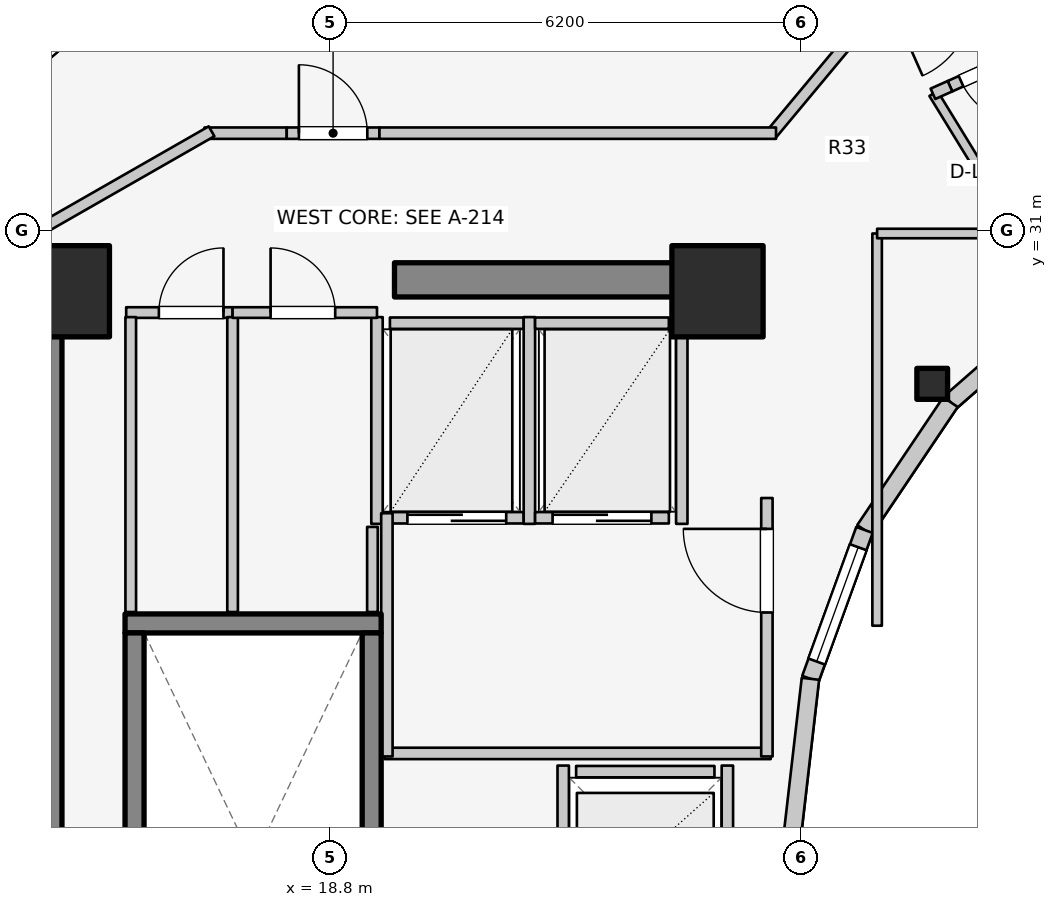
"""IFC4 building model, lengths in metres.
Left out: names, types, materials, properties, quantities, classifications, styles, units other than length and angle.
Written with IfcOpenShell. Run it as: python <this file> out.ifc"""

import sys

from ifc_helpers import new_model, si_unit, direction, frame, frame_2d, origin, origin_2d, place, context, subcontext, project, spatial, rectangle, i_section, extrude, element, fill, save


model = new_model("IFC4")
c1 = context("Model", 3, precision=1e-05, world=origin(), true_north=direction((0.0, 1.0)))
c2 = subcontext(c1, "Body", "Model", "MODEL_VIEW")
j1 = project(units=[si_unit("LENGTHUNIT", "METRE"), si_unit("PLANEANGLEUNIT", "RADIAN")], contexts=[c1])
p1 = place(None, origin())
s1 = spatial("IfcSite", under=j1, at=p1, CompositionType="ELEMENT")
p2 = place(p1, origin())
s2 = spatial("IfcBuilding", under=s1, at=p2, CompositionType="ELEMENT")
p3 = place(p2, frame((0.0, 0.0, 256.8)))
s3 = spatial("IfcBuildingStorey", under=s2, at=p3, CompositionType="ELEMENT", Elevation=256.8)
p4 = place(p3, frame((15.05, 17.05, 0.0), z_axis=(0.0, 0.0, 1.0), x_axis=(0.0, 1.0, 0.0)))
e1 = element("IfcWall", 1, at=p4, inside=s3, PredefinedType="SHEAR", context=c2, shape_type="SweptSolid", body=[
    extrude(rectangle(XDim=12.8, YDim=0.45, at=frame_2d((6.4, 0.0))), origin(), (0.0, 0.0, 1.0), 3.6),
])
p5 = place(p3, frame((19.65, 30.35, 0.0), z_axis=(0.0, 0.0, 1.0), x_axis=(1.0, 0.0, 0.0)))
e2 = element("IfcWall", 2, at=p5, inside=s3, PredefinedType="SHEAR", context=c2, shape_type="SweptSolid", body=[
    extrude(rectangle(XDim=4.5, YDim=0.45, at=frame_2d((2.25, 0.0))), origin(), (0.0, 0.0, 1.0), 3.6),
])
p6 = place(p3, frame((16.105, 25.83, 0.0), z_axis=(0.0, 0.0, 1.0), x_axis=(1.0, 0.0, 0.0)))
e3 = element("IfcWall", 3, at=p6, inside=s3, PredefinedType="SOLIDWALL", context=c2, shape_type="SweptSolid", body=[
    extrude(rectangle(XDim=3.37, YDim=0.25, at=frame_2d((1.685, 0.0))), origin(), (0.0, 0.0, 1.0), 3.6),
])
for number, where, z_axis, x_axis in (
    (4, (16.23, 17.895, 0.0), (0.0, 0.0, 1.0), (0.0, 1.0, 0.0)),
    (5, (19.35, 17.895, 0.0), (0.0, 0.0, 1.0), (0.0, 1.0, 0.0)),
):
    element("IfcWall", number, at=place(p3, frame(where, z_axis=z_axis, x_axis=x_axis)), inside=s3, PredefinedType="SOLIDWALL", context=c2, shape_type="SweptSolid", body=[
        extrude(rectangle(XDim=7.81, YDim=0.25, at=frame_2d((3.905, 0.0))), origin(), (0.0, 0.0, 1.0), 3.6),
    ])
for number, where, z_axis, x_axis in (
    (6, (23.9, 30.2, 0.0), (0.0, 0.0, 1.0), (1.0, 0.0, 0.0)),
    (7, (15.3, 30.2, 0.0), (0.0, 0.0, 1.0), (1.0, 0.0, 0.0)),
):
    element("IfcColumn", number, at=place(p3, frame(where, z_axis=z_axis, x_axis=x_axis)), inside=s3, PredefinedType="COLUMN", context=c2, shape_type="SweptSolid", body=[
        extrude(rectangle(XDim=1.2, YDim=1.2, at=origin_2d()), origin(), (0.0, 0.0, 1.0), 3.6),
    ])
p7 = place(p3, frame((26.725, 28.982, 0.0), z_axis=(0.0, 0.0, 1.0), x_axis=(1.0, 0.0, 0.0)))
e8 = element("IfcColumn", 8, at=p7, inside=s3, PredefinedType="COLUMN", context=c2, shape_type="SweptSolid", body=[
    extrude(i_section(OverallWidth=0.404, OverallDepth=0.407, WebThickness=0.027, FlangeThickness=0.044, FilletRadius=0.025, at=origin_2d()), origin(), (0.0, 0.0, 1.0), 3.6),
])
p8 = place(p3, frame((28.44, 30.032, 0.0), z_axis=(0.0, 0.0, 1.0), x_axis=(-0.752576694707, -0.658504607869, 0.0)))
e9 = element("IfcWall", 9, at=p8, inside=s3, PredefinedType="STANDARD", context=c2, shape_type="SweptSolid", body=[
    extrude(rectangle(XDim=1.959, YDim=0.23, at=frame_2d((0.98, 0.0))), origin(), (0.0, 0.0, 1.0), 1.72),
])
p9 = place(p3, frame((26.965, 28.742, 0.0), z_axis=(0.0, 0.0, 1.0), x_axis=(-0.558197800898, -0.829707909492, 0.0)))
e10 = element("IfcWall", 10, at=p9, inside=s3, PredefinedType="STANDARD", context=c2, shape_type="SweptSolid", body=[
    extrude(rectangle(XDim=2.027, YDim=0.23, at=frame_2d((1.013, 0.0))), origin(), (0.0, 0.0, 1.0), 1.72),
])
p10 = place(p3, frame((25.834, 27.06, 0.0), z_axis=(0.0, 0.0, 1.0), x_axis=(-0.341423187295, -0.93990968033, 0.0)))
e11 = element("IfcWall", 11, at=p10, inside=s3, PredefinedType="STANDARD", context=c2, shape_type="SweptSolid", body=[
    extrude(rectangle(XDim=2.084, YDim=0.23, at=frame_2d((1.042, 0.0))), origin(), (0.0, 0.0, 1.0), 3.06),
])
p11 = place(p10, frame((0.242, 0.0, 0.85)))
e12 = element("IfcOpeningElement", 12, at=p11, cuts=e11, PredefinedType="OPENING", context=c2, shape_type="SweptSolid", body=[
    extrude(rectangle(XDim=1.6, YDim=1.65, at=frame_2d((0.8, 0.825))), frame((0.0, 0.125, 0.0), z_axis=(0.0, -1.0, 0.0), x_axis=(1.0, 0.0, 0.0)), (0.0, 0.0, 1.0), 0.25),
])
p12 = place(p3, frame((25.123, 25.102, 0.0), z_axis=(0.0, 0.0, 1.0), x_axis=(-0.114711713601, -0.993398823617, 0.0)))
e13 = element("IfcWall", 13, at=p12, inside=s3, PredefinedType="STANDARD", context=c2, shape_type="SweptSolid", body=[
    extrude(rectangle(XDim=2.115, YDim=0.23, at=frame_2d((1.058, 0.0))), origin(), (0.0, 0.0, 1.0), 3.06),
])
p13 = place(p3, frame((16.442, 34.572, 0.0), z_axis=(0.0, 0.0, 1.0), x_axis=(-0.759587504333, -0.650405122413, 0.0)))
e14 = element("IfcWall", 14, at=p13, inside=s3, PredefinedType="STANDARD", context=c2, shape_type="SweptSolid", body=[
    extrude(rectangle(XDim=4.217, YDim=0.26, at=frame_2d((2.109, 0.0))), origin(), (0.0, 0.0, 1.0), 1.72),
])
p14 = place(p13, frame((1.509, 0.0, 0.15)))
e15 = element("IfcOpeningElement", 15, at=p14, cuts=e14, PredefinedType="OPENING", context=c2, shape_type="SweptSolid", body=[
    extrude(rectangle(XDim=1.2, YDim=0.9, at=frame_2d((0.6, 0.45))), frame((0.0, 0.14, 0.0), z_axis=(0.0, -1.0, 0.0), x_axis=(1.0, 0.0, 0.0)), (0.0, 0.0, 1.0), 0.28),
])
p15 = place(p3, frame((22.04, 23.88, 0.0), z_axis=(0.0, 0.0, 1.0), x_axis=(1.0, 0.0, 0.0)))
e16 = element("IfcWall", 16, at=p15, inside=s3, PredefinedType="SOLIDWALL", context=c2, shape_type="SweptSolid", body=[
    extrude(rectangle(XDim=1.82, YDim=0.15, at=frame_2d((0.91, 0.0))), origin(), (0.0, 0.0, 1.0), 2.62),
])
p16 = place(p3, frame((21.87, 21.64, 0.0), z_axis=(0.0, 0.0, 1.0), x_axis=(0.0, 1.0, 0.0)))
e17 = element("IfcWall", 17, at=p16, inside=s3, PredefinedType="SOLIDWALL", context=c2, shape_type="SweptSolid", body=[
    extrude(rectangle(XDim=2.32, YDim=0.15, at=frame_2d((1.16, 0.0))), origin(), (0.0, 0.0, 1.0), 3.075),
])
p17 = place(p3, frame((24.03, 21.64, 0.0), z_axis=(0.0, 0.0, 1.0), x_axis=(0.0, 1.0, 0.0)))
e18 = element("IfcWall", 18, at=p17, inside=s3, PredefinedType="SOLIDWALL", context=c2, shape_type="SweptSolid", body=[
    extrude(rectangle(XDim=2.32, YDim=0.15, at=frame_2d((1.16, 0.0))), origin(), (0.0, 0.0, 1.0), 2.62),
])
p18 = place(p3, frame((19.59, 27.22, 0.0), z_axis=(0.0, 0.0, 1.0), x_axis=(1.0, 0.0, 0.0)))
e19 = element("IfcWall", 19, at=p18, inside=s3, PredefinedType="SOLIDWALL", context=c2, shape_type="SweptSolid", body=[
    extrude(rectangle(XDim=1.76, YDim=0.15, at=frame_2d((0.88, 0.0))), origin(), (0.0, 0.0, 1.0), 3.075),
])
p19 = place(p18, frame((0.23, 0.0, 0.0)))
e20 = element("IfcOpeningElement", 20, at=p19, cuts=e19, PredefinedType="OPENING", context=c2, shape_type="SweptSolid", body=[
    extrude(rectangle(XDim=1.3, YDim=2.1, at=frame_2d((0.65, 1.05))), frame((0.0, 0.085, 0.0), z_axis=(0.0, -1.0, 0.0), x_axis=(1.0, 0.0, 0.0)), (0.0, 0.0, 1.0), 0.17),
])
p20 = place(p3, frame((19.59, 29.78, 0.0), z_axis=(0.0, 0.0, 1.0), x_axis=(1.0, 0.0, 0.0)))
e21 = element("IfcWall", 21, at=p20, inside=s3, PredefinedType="SOLIDWALL", context=c2, shape_type="SweptSolid", body=[
    extrude(rectangle(XDim=1.76, YDim=0.15, at=frame_2d((0.88, 0.0))), origin(), (0.0, 0.0, 1.0), 3.075),
])
for number, where, z_axis, x_axis in (
    (22, (19.42, 27.14, 0.0), (0.0, 0.0, 1.0), (0.0, 1.0, 0.0)),
    (23, (21.425, 27.14, 0.0), (0.0, 0.0, 1.0), (0.0, 1.0, 0.0)),
):
    element("IfcWall", number, at=place(p3, frame(where, z_axis=z_axis, x_axis=x_axis)), inside=s3, PredefinedType="SOLIDWALL", context=c2, shape_type="SweptSolid", body=[
        extrude(rectangle(XDim=2.72, YDim=0.15, at=frame_2d((1.36, 0.0))), origin(), (0.0, 0.0, 1.0), 3.075),
    ])
p21 = place(p3, frame((21.5, 27.22, 0.0), z_axis=(0.0, 0.0, 1.0), x_axis=(1.0, 0.0, 0.0)))
e24 = element("IfcWall", 24, at=p21, inside=s3, PredefinedType="SOLIDWALL", context=c2, shape_type="SweptSolid", body=[
    extrude(rectangle(XDim=1.76, YDim=0.15, at=frame_2d((0.88, 0.0))), origin(), (0.0, 0.0, 1.0), 3.075),
])
p22 = place(p21, frame((0.23, 0.0, 0.0)))
e25 = element("IfcOpeningElement", 25, at=p22, cuts=e24, PredefinedType="OPENING", context=c2, shape_type="SweptSolid", body=[
    extrude(rectangle(XDim=1.3, YDim=2.1, at=frame_2d((0.65, 1.05))), frame((0.0, 0.085, 0.0), z_axis=(0.0, -1.0, 0.0), x_axis=(1.0, 0.0, 0.0)), (0.0, 0.0, 1.0), 0.17),
])
p23 = place(p3, frame((21.5, 29.78, 0.0), z_axis=(0.0, 0.0, 1.0), x_axis=(1.0, 0.0, 0.0)))
e26 = element("IfcWall", 26, at=p23, inside=s3, PredefinedType="SOLIDWALL", context=c2, shape_type="SweptSolid", body=[
    extrude(rectangle(XDim=1.76, YDim=0.15, at=frame_2d((0.88, 0.0))), origin(), (0.0, 0.0, 1.0), 3.075),
])
p24 = place(p3, frame((23.43, 27.14, 0.0), z_axis=(0.0, 0.0, 1.0), x_axis=(0.0, 1.0, 0.0)))
e27 = element("IfcWall", 27, at=p24, inside=s3, PredefinedType="SOLIDWALL", context=c2, shape_type="SweptSolid", body=[
    extrude(rectangle(XDim=2.72, YDim=0.15, at=frame_2d((1.36, 0.0))), origin(), (0.0, 0.0, 1.0), 3.075),
])
p25 = place(p3, frame((19.52, 24.12, 0.0), z_axis=(0.0, 0.0, 1.0), x_axis=(1.0, 0.0, 0.0)))
e28 = element("IfcWall", 28, at=p25, inside=s3, PredefinedType="PARTITIONING", context=c2, shape_type="SweptSolid", body=[
    extrude(rectangle(XDim=5.08, YDim=0.15, at=frame_2d((2.54, 0.0))), origin(), (0.0, 0.0, 1.0), 2.62),
])
p26 = place(p3, frame((19.55, 24.08, 0.0), z_axis=(0.0, 0.0, 1.0), x_axis=(0.0, 1.0, 0.0)))
e29 = element("IfcWall", 29, at=p26, inside=s3, PredefinedType="PARTITIONING", context=c2, shape_type="SweptSolid", body=[
    extrude(rectangle(XDim=3.2, YDim=0.15, at=frame_2d((1.6, 0.0))), origin(), (0.0, 0.0, 1.0), 3.075),
])
p27 = place(p3, frame((24.55, 24.08, 0.0), z_axis=(0.0, 0.0, 1.0), x_axis=(0.0, 1.0, 0.0)))
e30 = element("IfcWall", 30, at=p27, inside=s3, PredefinedType="PARTITIONING", context=c2, shape_type="SweptSolid", body=[
    extrude(rectangle(XDim=3.4, YDim=0.15, at=frame_2d((1.7, 0.0))), origin(), (0.0, 0.0, 1.0), 3.075),
])
p28 = place(p27, frame((1.894, 0.0, 0.0)))
e31 = element("IfcOpeningElement", 31, at=p28, cuts=e30, PredefinedType="OPENING", context=c2, shape_type="SweptSolid", body=[
    extrude(rectangle(XDim=1.1, YDim=2.1, at=frame_2d((0.55, 1.05))), frame((0.0, 0.085, 0.0), z_axis=(0.0, -1.0, 0.0), x_axis=(1.0, 0.0, 0.0)), (0.0, 0.0, 1.0), 0.17),
])
p29 = place(p3, frame((16.12, 29.92, 0.0), z_axis=(0.0, 0.0, 1.0), x_axis=(1.0, 0.0, 0.0)))
e32 = element("IfcWall", 32, at=p29, inside=s3, PredefinedType="PLUMBINGWALL", context=c2, shape_type="SweptSolid", body=[
    extrude(rectangle(XDim=1.4, YDim=0.14, at=frame_2d((0.7, 0.0))), origin(), (0.0, 0.0, 1.0), 3.075),
])
p30 = place(p29, frame((0.43, 0.0, 0.0)))
e33 = element("IfcOpeningElement", 33, at=p30, cuts=e32, PredefinedType="OPENING", context=c2, shape_type="SweptSolid", body=[
    extrude(rectangle(XDim=0.85, YDim=2.05, at=frame_2d((0.425, 1.025))), frame((0.0, 0.08, 0.0), z_axis=(0.0, -1.0, 0.0), x_axis=(1.0, 0.0, 0.0)), (0.0, 0.0, 1.0), 0.16),
])
for number, where, z_axis, x_axis in (
    (34, (16.18, 25.98, 0.0), (0.0, 0.0, 1.0), (0.0, 1.0, 0.0)),
    (35, (17.52, 25.98, 0.0), (0.0, 0.0, 1.0), (0.0, 1.0, 0.0)),
):
    element("IfcWall", number, at=place(p3, frame(where, z_axis=z_axis, x_axis=x_axis)), inside=s3, PredefinedType="PLUMBINGWALL", context=c2, shape_type="SweptSolid", body=[
        extrude(rectangle(XDim=3.88, YDim=0.14, at=frame_2d((1.94, 0.0))), origin(), (0.0, 0.0, 1.0), 3.075),
    ])
p31 = place(p3, frame((17.52, 29.92, 0.0), z_axis=(0.0, 0.0, 1.0), x_axis=(1.0, 0.0, 0.0)))
e36 = element("IfcWall", 36, at=p31, inside=s3, PredefinedType="PLUMBINGWALL", context=c2, shape_type="SweptSolid", body=[
    extrude(rectangle(XDim=1.9, YDim=0.14, at=frame_2d((0.95, 0.0))), origin(), (0.0, 0.0, 1.0), 3.075),
])
p32 = place(p31, frame((0.5, 0.0, 0.0)))
e37 = element("IfcOpeningElement", 37, at=p32, cuts=e36, PredefinedType="OPENING", context=c2, shape_type="SweptSolid", body=[
    extrude(rectangle(XDim=0.85, YDim=2.05, at=frame_2d((0.425, 1.025))), frame((0.0, 0.08, 0.0), z_axis=(0.0, -1.0, 0.0), x_axis=(1.0, 0.0, 0.0)), (0.0, 0.0, 1.0), 0.16),
])
p33 = place(p3, frame((19.36, 25.98, 0.0), z_axis=(0.0, 0.0, 1.0), x_axis=(0.0, 1.0, 0.0)))
e38 = element("IfcWall", 38, at=p33, inside=s3, PredefinedType="PLUMBINGWALL", context=c2, shape_type="SweptSolid", body=[
    extrude(rectangle(XDim=1.12, YDim=0.14, at=frame_2d((0.56, 0.0))), origin(), (0.0, 0.0, 1.0), 3.075),
])
p34 = place(p3, frame((28.45, 30.015, 0.0), z_axis=(0.0, 0.0, 1.0), x_axis=(-0.522763432117, 0.852477796802, 0.0)))
e39 = element("IfcWall", 39, at=p34, inside=s3, PredefinedType="PARTITIONING", context=c2, shape_type="SweptSolid", body=[
    extrude(rectangle(XDim=3.269, YDim=0.125, at=frame_2d((1.635, 0.0))), origin(), (0.0, 0.0, 1.0), 1.72),
])
p35 = place(p3, frame((28.118, 33.415, 0.0), z_axis=(0.0, 0.0, 1.0), x_axis=(-0.913351162958, -0.407172755871, 0.0)))
e40 = element("IfcWall", 40, at=p35, inside=s3, PredefinedType="PARTITIONING", context=c2, shape_type="SweptSolid", body=[
    extrude(rectangle(XDim=1.27, YDim=0.15, at=frame_2d((0.635, 0.0))), origin(), (0.0, 0.0, 1.0), 2.16),
])
p36 = place(p35, frame((0.16, 0.0, 0.0)))
e41 = element("IfcOpeningElement", 41, at=p36, cuts=e40, PredefinedType="OPENING", context=c2, shape_type="SweptSolid", body=[
    extrude(rectangle(XDim=0.95, YDim=2.1, at=frame_2d((0.475, 1.05))), frame((0.0, 0.085, 0.0), z_axis=(0.0, -1.0, 0.0), x_axis=(1.0, 0.0, 0.0)), (0.0, 0.0, 1.0), 0.17),
])
p37 = place(p3, frame((26.958, 32.898, 0.0), z_axis=(0.0, 0.0, 1.0), x_axis=(-0.912906122814, -0.408169585991, 0.0)))
e42 = element("IfcWall", 42, at=p37, inside=s3, PredefinedType="PARTITIONING", context=c2, shape_type="SweptSolid", body=[
    extrude(rectangle(XDim=0.245, YDim=0.15, at=frame_2d((0.123, 0.0))), origin(), (0.0, 0.0, 1.0), 3.075),
])
p38 = place(p3, frame((26.0, 25.8, 0.0), z_axis=(0.0, 0.0, 1.0), x_axis=(0.0, 1.0, 0.0)))
e43 = element("IfcWall", 43, at=p38, inside=s3, PredefinedType="PARTITIONING", context=c2, shape_type="SweptSolid", body=[
    extrude(rectangle(XDim=5.16, YDim=0.125, at=frame_2d((2.58, 0.0))), origin(), (0.0, 0.0, 1.0), 2.452),
])
p39 = place(p3, frame((26.0, 30.96, 0.0), z_axis=(0.0, 0.0, 1.0), x_axis=(1.0, 0.0, 0.0)))
e44 = element("IfcWall", 44, at=p39, inside=s3, PredefinedType="PARTITIONING", context=c2, shape_type="SweptSolid", body=[
    extrude(rectangle(XDim=2.6, YDim=0.125, at=frame_2d((1.3, 0.0))), origin(), (0.0, 0.0, 1.0), 1.72),
])
p40 = place(p3, frame((26.016, 33.955, 0.0), z_axis=(0.0, 0.0, 1.0), x_axis=(-0.64030392053, -0.76812166312, 0.0)))
e45 = element("IfcWall", 45, at=p40, inside=s3, PredefinedType="PARTITIONING", context=c2, shape_type="SweptSolid", body=[
    extrude(rectangle(XDim=2.21, YDim=0.15, at=frame_2d((1.105, 0.0))), origin(), (0.0, 0.0, 1.0), 1.72),
])
p41 = place(p3, frame((17.15, 32.28, 0.0), z_axis=(0.0, 0.0, 1.0), x_axis=(1.0, 0.0, 0.0)))
e46 = element("IfcWall", 46, at=p41, inside=s3, PredefinedType="PARTITIONING", context=c2, shape_type="SweptSolid", body=[
    extrude(rectangle(XDim=1.083, YDim=0.15, at=frame_2d((0.541, 0.0))), origin(), (0.0, 0.0, 1.0), 3.075),
])
p42 = place(p3, frame((18.232, 32.28, 0.0), z_axis=(0.0, 0.0, 1.0), x_axis=(1.0, 0.0, 0.0)))
e47 = element("IfcWall", 47, at=p42, inside=s3, PredefinedType="PARTITIONING", context=c2, shape_type="SweptSolid", body=[
    extrude(rectangle(XDim=1.22, YDim=0.15, at=frame_2d((0.61, 0.0))), origin(), (0.0, 0.0, 1.0), 2.16),
])
p43 = place(p42, frame((0.16, 0.0, 0.0)))
e48 = element("IfcOpeningElement", 48, at=p43, cuts=e47, PredefinedType="OPENING", context=c2, shape_type="SweptSolid", body=[
    extrude(rectangle(XDim=0.9, YDim=2.1, at=frame_2d((0.45, 1.05))), frame((0.0, 0.085, 0.0), z_axis=(0.0, -1.0, 0.0), x_axis=(1.0, 0.0, 0.0)), (0.0, 0.0, 1.0), 0.17),
])
p44 = place(p3, frame((19.452, 32.28, 0.0), z_axis=(0.0, 0.0, 1.0), x_axis=(1.0, 0.0, 0.0)))
e49 = element("IfcWall", 49, at=p44, inside=s3, PredefinedType="PARTITIONING", context=c2, shape_type="SweptSolid", body=[
    extrude(rectangle(XDim=5.218, YDim=0.15, at=frame_2d((2.609, 0.0))), origin(), (0.0, 0.0, 1.0), 1.72),
])
p45 = place(p3, frame((17.243, 32.305, 0.0), z_axis=(0.0, 0.0, 1.0), x_axis=(-0.867991349648, -0.496579315857, 0.0)))
e50 = element("IfcWall", 50, at=p45, inside=s3, PredefinedType="PARTITIONING", context=c2, shape_type="SweptSolid", body=[
    extrude(rectangle(XDim=2.567, YDim=0.15, at=frame_2d((1.283, 0.0))), origin(), (0.0, 0.0, 1.0), 1.72),
])
p46 = place(p11, origin())
e51 = element("IfcWindow", 51, at=p46, inside=s3, PartitioningType="SINGLE_PANEL", PredefinedType="WINDOW", context=c2, shape_type="SweptSolid", body=[
    extrude(rectangle(XDim=1.6, YDim=1.65, at=frame_2d((0.8, 0.825))), frame((0.0, 0.03, 0.0), z_axis=(0.0, -1.0, 0.0), x_axis=(1.0, 0.0, 0.0)), (0.0, 0.0, 1.0), 0.06),
])
fill(e12, e51)
p47 = place(p14, origin())
e52 = element("IfcWindow", 52, at=p47, inside=s3, PartitioningType="SINGLE_PANEL", PredefinedType="WINDOW", context=c2, shape_type="SweptSolid", body=[
    extrude(rectangle(XDim=1.2, YDim=0.9, at=frame_2d((0.6, 0.45))), frame((0.0, 0.03, 0.0), z_axis=(0.0, -1.0, 0.0), x_axis=(1.0, 0.0, 0.0)), (0.0, 0.0, 1.0), 0.06),
])
fill(e15, e52)
p48 = place(p19, origin())
e53 = element("IfcDoor", 53, at=p48, inside=s3, OperationType="DOUBLE_DOOR_SLIDING", PredefinedType="DOOR", context=c2, shape_type="SweptSolid", body=[
    extrude(rectangle(XDim=1.3, YDim=2.1, at=frame_2d((0.65, 1.05))), frame((0.0, 0.025, 0.0), z_axis=(0.0, -1.0, 0.0), x_axis=(1.0, 0.0, 0.0)), (0.0, 0.0, 1.0), 0.05),
])
fill(e20, e53)
p49 = place(p22, origin())
e54 = element("IfcDoor", 54, at=p49, inside=s3, OperationType="DOUBLE_DOOR_SLIDING", PredefinedType="DOOR", context=c2, shape_type="SweptSolid", body=[
    extrude(rectangle(XDim=1.3, YDim=2.1, at=frame_2d((0.65, 1.05))), frame((0.0, 0.025, 0.0), z_axis=(0.0, -1.0, 0.0), x_axis=(1.0, 0.0, 0.0)), (0.0, 0.0, 1.0), 0.05),
])
fill(e25, e54)
p50 = place(p28, origin())
e55 = element("IfcDoor", 55, at=p50, inside=s3, OperationType="SINGLE_SWING_RIGHT", PredefinedType="DOOR", context=c2, shape_type="SweptSolid", body=[
    extrude(rectangle(XDim=1.1, YDim=2.1, at=frame_2d((0.55, 1.05))), frame((0.0, 0.025, 0.0), z_axis=(0.0, -1.0, 0.0), x_axis=(1.0, 0.0, 0.0)), (0.0, 0.0, 1.0), 0.05),
])
fill(e31, e55)
p51 = place(p30, origin())
e56 = element("IfcDoor", 56, at=p51, inside=s3, OperationType="SINGLE_SWING_RIGHT", PredefinedType="DOOR", context=c2, shape_type="SweptSolid", body=[
    extrude(rectangle(XDim=0.85, YDim=2.05, at=frame_2d((0.425, 1.025))), frame((0.0, 0.025, 0.0), z_axis=(0.0, -1.0, 0.0), x_axis=(1.0, 0.0, 0.0)), (0.0, 0.0, 1.0), 0.05),
])
fill(e33, e56)
p52 = place(p32, origin())
e57 = element("IfcDoor", 57, at=p52, inside=s3, OperationType="SINGLE_SWING_LEFT", PredefinedType="DOOR", context=c2, shape_type="SweptSolid", body=[
    extrude(rectangle(XDim=0.85, YDim=2.05, at=frame_2d((0.425, 1.025))), frame((0.0, 0.025, 0.0), z_axis=(0.0, -1.0, 0.0), x_axis=(1.0, 0.0, 0.0)), (0.0, 0.0, 1.0), 0.05),
])
fill(e37, e57)
p53 = place(p36, origin())
e58 = element("IfcDoor", 58, at=p53, inside=s3, OperationType="SINGLE_SWING_LEFT", PredefinedType="DOOR", context=c2, shape_type="SweptSolid", body=[
    extrude(rectangle(XDim=0.95, YDim=2.1, at=frame_2d((0.475, 1.05))), frame((0.0, 0.025, 0.0), z_axis=(0.0, -1.0, 0.0), x_axis=(1.0, 0.0, 0.0)), (0.0, 0.0, 1.0), 0.05),
])
fill(e41, e58)
p54 = place(p43, origin())
e59 = element("IfcDoor", 59, at=p54, inside=s3, OperationType="SINGLE_SWING_LEFT", PredefinedType="DOOR", context=c2, shape_type="SweptSolid", body=[
    extrude(rectangle(XDim=0.9, YDim=2.1, at=frame_2d((0.45, 1.05))), frame((0.0, 0.025, 0.0), z_axis=(0.0, -1.0, 0.0), x_axis=(1.0, 0.0, 0.0)), (0.0, 0.0, 1.0), 0.05),
])
fill(e48, e59)
save(model, sys.argv[1])
